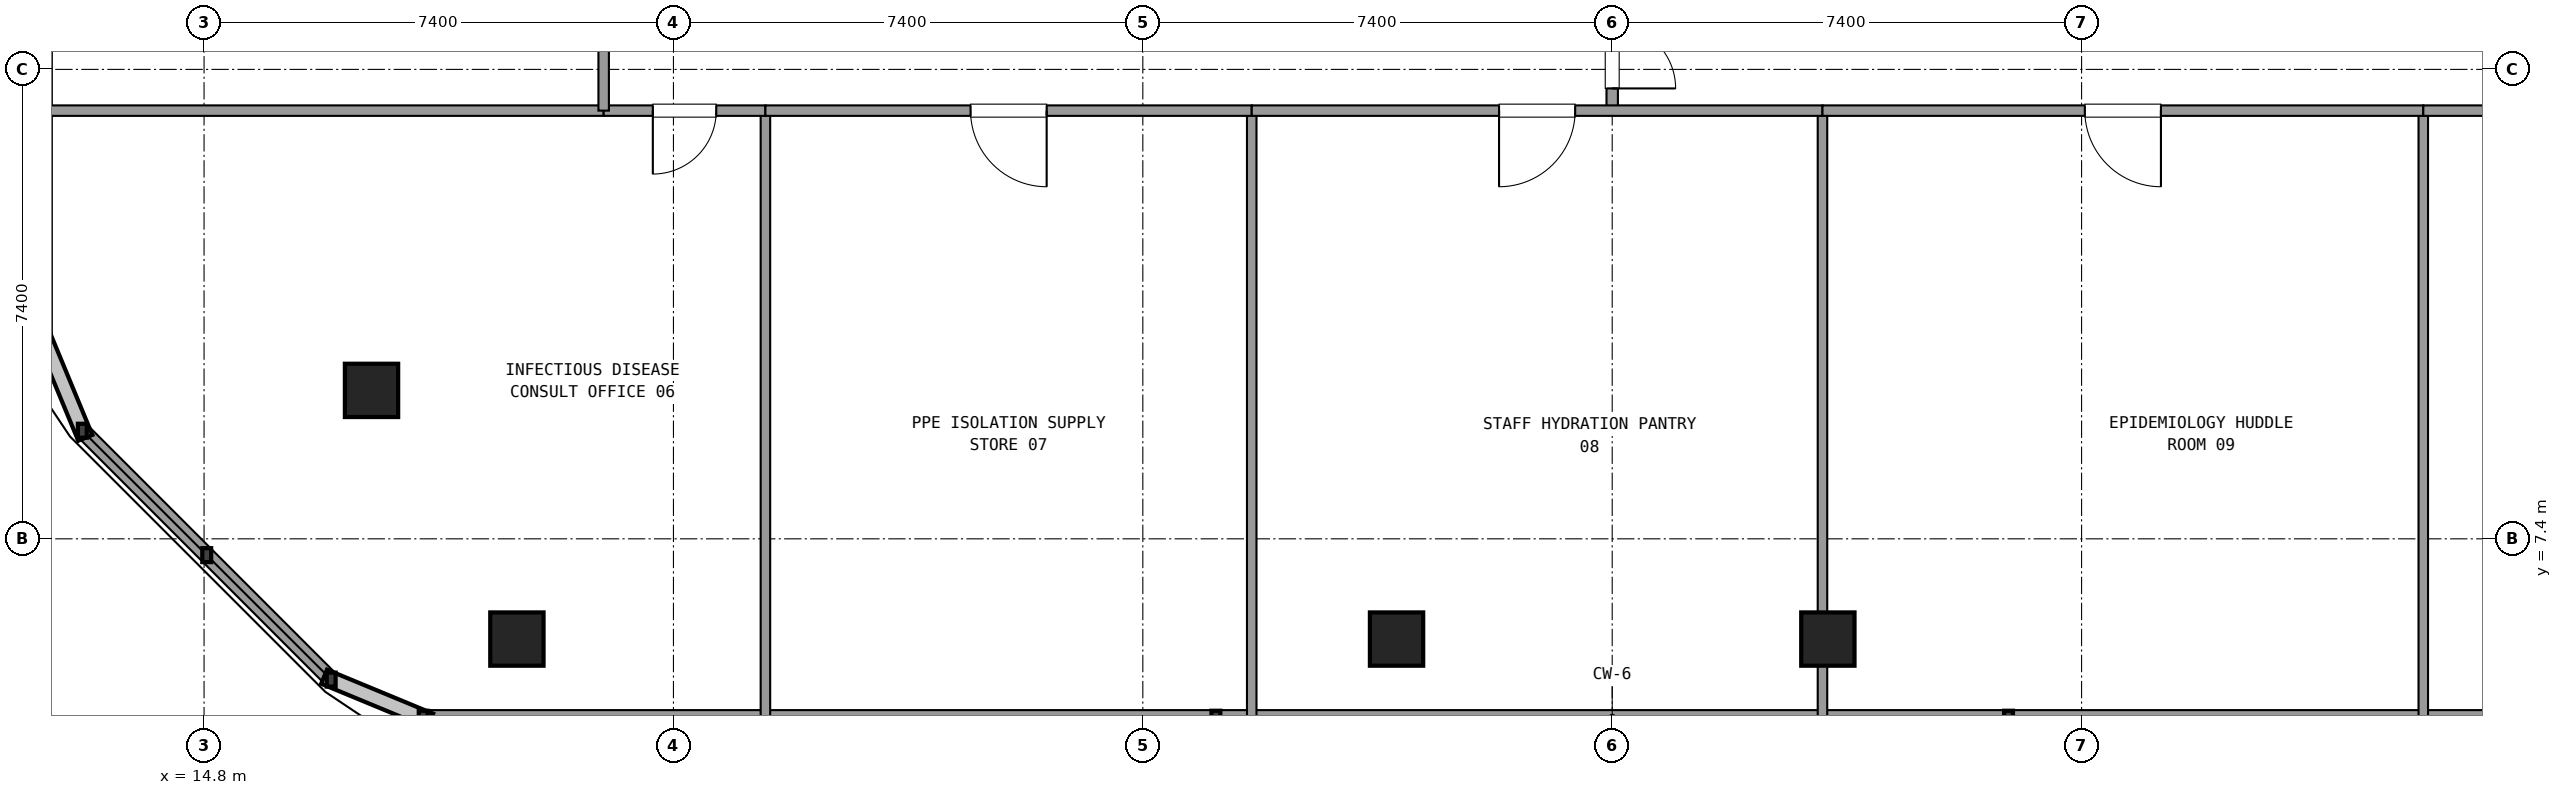
"""IFC4 building model, lengths in metres.
Left out: names, types, materials, properties, quantities, classifications, styles, units other than length and angle.
Written with IfcOpenShell. Run it as: python <this file> out.ifc"""

import sys

from ifc_helpers import new_model, si_unit, direction, frame, frame_2d, origin, origin_2d, place, context, subcontext, project, spatial, rectangle, extrude, element, fill, save


model = new_model("IFC4")
c1 = context("Model", 3, precision=1e-05, world=origin(), true_north=direction((0.0, 1.0)))
c2 = subcontext(c1, "Body", "Model", "MODEL_VIEW")
j1 = project(units=[si_unit("LENGTHUNIT", "METRE"), si_unit("PLANEANGLEUNIT", "RADIAN")], contexts=[c1])
p1 = place(None, origin())
s1 = spatial("IfcSite", under=j1, at=p1, CompositionType="ELEMENT")
p2 = place(p1, origin())
s2 = spatial("IfcBuilding", under=s1, at=p2, CompositionType="ELEMENT")
p3 = place(p2, frame((0.0, 0.0, 260.82)))
s3 = spatial("IfcBuildingStorey", under=s2, at=p3, CompositionType="ELEMENT", Elevation=260.82)
for number, where, z_axis, x_axis in (
    (1, (17.44, 9.74, 0.0), (0.0, 0.0, 1.0), (1.0, 0.0, 0.0)),
    (2, (19.732, 5.82, 0.0), (0.0, 0.0, 1.0), (1.0, 0.0, 0.0)),
    (3, (33.6, 5.82, 0.0), (0.0, 0.0, 1.0), (1.0, 0.0, 0.0)),
    (4, (40.4, 5.82, 0.0), (0.0, 0.0, 1.0), (1.0, 0.0, 0.0)),
):
    element("IfcColumn", number, at=place(p3, frame(where, z_axis=z_axis, x_axis=x_axis)), inside=s3, PredefinedType="COLUMN", context=c2, shape_type="SweptSolid", body=[
        extrude(rectangle(XDim=0.84, YDim=0.84, at=origin_2d()), origin(), (0.0, 0.0, 1.0), 3.6),
    ])
p4 = place(p3, frame((18.255, 4.58, 0.0), z_axis=(0.0, 0.0, 1.0), x_axis=(1.0, 0.0, 0.0)))
e5 = element("IfcWall", 5, at=p4, inside=s3, PredefinedType="SOLIDWALL", context=c2, shape_type="SweptSolid", body=[
    extrude(rectangle(XDim=37.49, YDim=0.24, at=frame_2d((18.745, 0.0))), origin(), (0.0, 0.0, 1.0), 0.85),
])
p5 = place(p3, frame((12.28, 41.245, 0.0), z_axis=(0.0, 0.0, 1.0), x_axis=(0.0, -1.0, 0.0)))
e6 = element("IfcWall", 6, at=p5, inside=s3, PredefinedType="SOLIDWALL", context=c2, shape_type="SweptSolid", body=[
    extrude(rectangle(XDim=30.69, YDim=0.24, at=frame_2d((15.345, 0.0))), origin(), (0.0, 0.0, 1.0), 0.85),
])
p6 = place(p3, frame((12.881, 9.104, 0.0), z_axis=(0.0, 0.0, 1.0), x_axis=(0.707084777957, -0.707128783731, 0.0)))
e7 = element("IfcWall", 7, at=p6, inside=s3, PredefinedType="SOLIDWALL", context=c2, shape_type="SweptSolid", body=[
    extrude(rectangle(XDim=5.548, YDim=0.24, at=frame_2d((2.774, 0.0))), origin(), (0.0, 0.0, 1.0), 0.85),
])
p7 = place(p3, frame((37.0, 14.15, 0.0), z_axis=(0.0, 0.0, 1.0), x_axis=(0.0, 1.0, 0.0)))
e8 = element("IfcWall", 8, at=p7, inside=s3, PredefinedType="PARTITIONING", context=c2, shape_type="SweptSolid", body=[
    extrude(rectangle(XDim=2.7, YDim=0.18, at=frame_2d((1.35, 0.0))), origin(), (0.0, 0.0, 1.0), 2.61),
])
p8 = place(p7, frame((0.35, 0.0, 0.0)))
e9 = element("IfcOpeningElement", 9, at=p8, cuts=e8, PredefinedType="OPENING", context=c2, shape_type="SweptSolid", body=[
    extrude(rectangle(XDim=2.0, YDim=2.2, at=frame_2d((1.0, 1.1))), frame((0.0, 0.1, 0.0), z_axis=(0.0, -1.0, 0.0), x_axis=(1.0, 0.0, 0.0)), (0.0, 0.0, 1.0), 0.2),
])
p9 = place(p3, frame((12.3, 14.15, 0.0), z_axis=(0.0, 0.0, 1.0), x_axis=(1.0, 0.0, 0.0)))
e10 = element("IfcWall", 10, at=p9, inside=s3, PredefinedType="PARTITIONING", context=c2, shape_type="SweptSolid", body=[
    extrude(rectangle(XDim=8.8, YDim=0.165, at=frame_2d((4.4, 0.0))), origin(), (0.0, 0.0, 1.0), 2.61),
])
p10 = place(p3, frame((23.65, 14.15, 0.0), z_axis=(0.0, 0.0, 1.0), x_axis=(0.0, -1.0, 0.0)))
e11 = element("IfcWall", 11, at=p10, inside=s3, PredefinedType="PARTITIONING", context=c2, shape_type="SweptSolid", body=[
    extrude(rectangle(XDim=9.55, YDim=0.15, at=frame_2d((4.775, 0.0))), origin(), (0.0, 0.0, 1.0), 2.61),
])
p11 = place(p3, frame((21.1, 14.15, 0.0), z_axis=(0.0, 0.0, 1.0), x_axis=(1.0, 0.0, 0.0)))
e12 = element("IfcWall", 12, at=p11, inside=s3, PredefinedType="PARTITIONING", context=c2, shape_type="SweptSolid", body=[
    extrude(rectangle(XDim=2.55, YDim=0.165, at=frame_2d((1.275, 0.0))), origin(), (0.0, 0.0, 1.0), 2.61),
])
p12 = place(p11, frame((0.775, 0.0, 0.0)))
e13 = element("IfcOpeningElement", 13, at=p12, cuts=e12, PredefinedType="OPENING", context=c2, shape_type="SweptSolid", body=[
    extrude(rectangle(XDim=1.0, YDim=2.15, at=frame_2d((0.5, 1.075))), frame((0.0, 0.093, 0.0), z_axis=(0.0, -1.0, 0.0), x_axis=(1.0, 0.0, 0.0)), (0.0, 0.0, 1.0), 0.185),
])
p13 = place(p3, frame((31.317, 14.15, 0.0), z_axis=(0.0, 0.0, 1.0), x_axis=(0.0, -1.0, 0.0)))
e14 = element("IfcWall", 14, at=p13, inside=s3, PredefinedType="PARTITIONING", context=c2, shape_type="SweptSolid", body=[
    extrude(rectangle(XDim=9.55, YDim=0.15, at=frame_2d((4.775, 0.0))), origin(), (0.0, 0.0, 1.0), 2.61),
])
p14 = place(p3, frame((23.65, 14.15, 0.0), z_axis=(0.0, 0.0, 1.0), x_axis=(1.0, 0.0, 0.0)))
e15 = element("IfcWall", 15, at=p14, inside=s3, PredefinedType="PARTITIONING", context=c2, shape_type="SweptSolid", body=[
    extrude(rectangle(XDim=7.667, YDim=0.165, at=frame_2d((3.833, 0.0))), origin(), (0.0, 0.0, 1.0), 2.61),
])
p15 = place(p14, frame((3.234, 0.0, 0.0)))
e16 = element("IfcOpeningElement", 16, at=p15, cuts=e15, PredefinedType="OPENING", context=c2, shape_type="SweptSolid", body=[
    extrude(rectangle(XDim=1.2, YDim=2.15, at=frame_2d((0.6, 1.075))), frame((0.0, 0.093, 0.0), z_axis=(0.0, -1.0, 0.0), x_axis=(1.0, 0.0, 0.0)), (0.0, 0.0, 1.0), 0.185),
])
p16 = place(p3, frame((40.315, 14.15, 0.0), z_axis=(0.0, 0.0, 1.0), x_axis=(0.0, -1.0, 0.0)))
e17 = element("IfcWall", 17, at=p16, inside=s3, PredefinedType="PARTITIONING", context=c2, shape_type="SweptSolid", body=[
    extrude(rectangle(XDim=9.55, YDim=0.15, at=frame_2d((4.775, 0.0))), origin(), (0.0, 0.0, 1.0), 2.61),
])
p17 = place(p3, frame((31.317, 14.15, 0.0), z_axis=(0.0, 0.0, 1.0), x_axis=(1.0, 0.0, 0.0)))
e18 = element("IfcWall", 18, at=p17, inside=s3, PredefinedType="PARTITIONING", context=c2, shape_type="SweptSolid", body=[
    extrude(rectangle(XDim=8.998, YDim=0.165, at=frame_2d((4.499, 0.0))), origin(), (0.0, 0.0, 1.0), 2.61),
])
p18 = place(p17, frame((3.899, 0.0, 0.0)))
e19 = element("IfcOpeningElement", 19, at=p18, cuts=e18, PredefinedType="OPENING", context=c2, shape_type="SweptSolid", body=[
    extrude(rectangle(XDim=1.2, YDim=2.15, at=frame_2d((0.6, 1.075))), frame((0.0, 0.093, 0.0), z_axis=(0.0, -1.0, 0.0), x_axis=(1.0, 0.0, 0.0)), (0.0, 0.0, 1.0), 0.185),
])
p19 = place(p3, frame((49.787, 14.15, 0.0), z_axis=(0.0, 0.0, 1.0), x_axis=(0.0, -1.0, 0.0)))
e20 = element("IfcWall", 20, at=p19, inside=s3, PredefinedType="PARTITIONING", context=c2, shape_type="SweptSolid", body=[
    extrude(rectangle(XDim=9.55, YDim=0.15, at=frame_2d((4.775, 0.0))), origin(), (0.0, 0.0, 1.0), 2.61),
])
p20 = place(p3, frame((40.315, 14.15, 0.0), z_axis=(0.0, 0.0, 1.0), x_axis=(1.0, 0.0, 0.0)))
e21 = element("IfcWall", 21, at=p20, inside=s3, PredefinedType="PARTITIONING", context=c2, shape_type="SweptSolid", body=[
    extrude(rectangle(XDim=9.472, YDim=0.165, at=frame_2d((4.736, 0.0))), origin(), (0.0, 0.0, 1.0), 2.61),
])
p21 = place(p20, frame((4.136, 0.0, 0.0)))
e22 = element("IfcOpeningElement", 22, at=p21, cuts=e21, PredefinedType="OPENING", context=c2, shape_type="SweptSolid", body=[
    extrude(rectangle(XDim=1.2, YDim=2.15, at=frame_2d((0.6, 1.075))), frame((0.0, 0.093, 0.0), z_axis=(0.0, -1.0, 0.0), x_axis=(1.0, 0.0, 0.0)), (0.0, 0.0, 1.0), 0.185),
])
p22 = place(p3, frame((49.787, 14.15, 0.0), z_axis=(0.0, 0.0, 1.0), x_axis=(1.0, 0.0, 0.0)))
e23 = element("IfcWall", 23, at=p22, inside=s3, PredefinedType="PARTITIONING", context=c2, shape_type="SweptSolid", body=[
    extrude(rectangle(XDim=3.113, YDim=0.165, at=frame_2d((1.556, 0.0))), origin(), (0.0, 0.0, 1.0), 2.61),
])
p23 = place(p22, frame((0.956, 0.0, 0.0)))
e24 = element("IfcOpeningElement", 24, at=p23, cuts=e23, PredefinedType="OPENING", context=c2, shape_type="SweptSolid", body=[
    extrude(rectangle(XDim=1.2, YDim=2.15, at=frame_2d((0.6, 1.075))), frame((0.0, 0.093, 0.0), z_axis=(0.0, -1.0, 0.0), x_axis=(1.0, 0.0, 0.0)), (0.0, 0.0, 1.0), 0.185),
])
p24 = place(p3, frame((21.1, 14.15, 0.0), z_axis=(0.0, 0.0, 1.0), x_axis=(0.0, 1.0, 0.0)))
e25 = element("IfcWall", 25, at=p24, inside=s3, PredefinedType="PARTITIONING", context=c2, shape_type="SweptSolid", body=[
    extrude(rectangle(XDim=7.99, YDim=0.165, at=frame_2d((3.995, 0.0))), origin(), (0.0, 0.0, 1.0), 2.61),
])
p25 = place(p24, frame((3.395, 0.0, 0.0)))
e26 = element("IfcOpeningElement", 26, at=p25, cuts=e25, PredefinedType="OPENING", context=c2, shape_type="SweptSolid", body=[
    extrude(rectangle(XDim=1.2, YDim=2.15, at=frame_2d((0.6, 1.075))), frame((0.0, 0.093, 0.0), z_axis=(0.0, -1.0, 0.0), x_axis=(1.0, 0.0, 0.0)), (0.0, 0.0, 1.0), 0.185),
])
p26 = place(p8, frame((2.0, 0.0, 0.0), z_axis=(0.0, 0.0, 1.0), x_axis=(-1.0, 0.0, 0.0)))
e27 = element("IfcDoor", 27, at=p26, inside=s3, OperationType="DOUBLE_DOOR_SINGLE_SWING", PredefinedType="DOOR", context=c2, shape_type="SweptSolid", body=[
    extrude(rectangle(XDim=2.0, YDim=2.2, at=frame_2d((1.0, 1.1))), frame((0.0, 0.025, 0.0), z_axis=(0.0, -1.0, 0.0), x_axis=(1.0, 0.0, 0.0)), (0.0, 0.0, 1.0), 0.05),
])
fill(e9, e27)
p27 = place(p12, frame((1.0, 0.0, 0.0), z_axis=(0.0, 0.0, 1.0), x_axis=(-1.0, 0.0, 0.0)))
e28 = element("IfcDoor", 28, at=p27, inside=s3, OperationType="SINGLE_SWING_LEFT", PredefinedType="DOOR", context=c2, shape_type="SweptSolid", body=[
    extrude(rectangle(XDim=1.0, YDim=2.15, at=frame_2d((0.5, 1.075))), frame((0.0, 0.025, 0.0), z_axis=(0.0, -1.0, 0.0), x_axis=(1.0, 0.0, 0.0)), (0.0, 0.0, 1.0), 0.05),
])
fill(e13, e28)
p28 = place(p15, frame((1.2, 0.0, 0.0), z_axis=(0.0, 0.0, 1.0), x_axis=(-1.0, 0.0, 0.0)))
e29 = element("IfcDoor", 29, at=p28, inside=s3, OperationType="SINGLE_SWING_RIGHT", PredefinedType="DOOR", context=c2, shape_type="SweptSolid", body=[
    extrude(rectangle(XDim=1.2, YDim=2.15, at=frame_2d((0.6, 1.075))), frame((0.0, 0.025, 0.0), z_axis=(0.0, -1.0, 0.0), x_axis=(1.0, 0.0, 0.0)), (0.0, 0.0, 1.0), 0.05),
])
fill(e16, e29)
p29 = place(p18, frame((1.2, 0.0, 0.0), z_axis=(0.0, 0.0, 1.0), x_axis=(-1.0, 0.0, 0.0)))
e30 = element("IfcDoor", 30, at=p29, inside=s3, OperationType="SINGLE_SWING_LEFT", PredefinedType="DOOR", context=c2, shape_type="SweptSolid", body=[
    extrude(rectangle(XDim=1.2, YDim=2.15, at=frame_2d((0.6, 1.075))), frame((0.0, 0.025, 0.0), z_axis=(0.0, -1.0, 0.0), x_axis=(1.0, 0.0, 0.0)), (0.0, 0.0, 1.0), 0.05),
])
fill(e19, e30)
p30 = place(p21, frame((1.2, 0.0, 0.0), z_axis=(0.0, 0.0, 1.0), x_axis=(-1.0, 0.0, 0.0)))
e31 = element("IfcDoor", 31, at=p30, inside=s3, OperationType="SINGLE_SWING_RIGHT", PredefinedType="DOOR", context=c2, shape_type="SweptSolid", body=[
    extrude(rectangle(XDim=1.2, YDim=2.15, at=frame_2d((0.6, 1.075))), frame((0.0, 0.025, 0.0), z_axis=(0.0, -1.0, 0.0), x_axis=(1.0, 0.0, 0.0)), (0.0, 0.0, 1.0), 0.05),
])
fill(e22, e31)
save(model, sys.argv[1])
